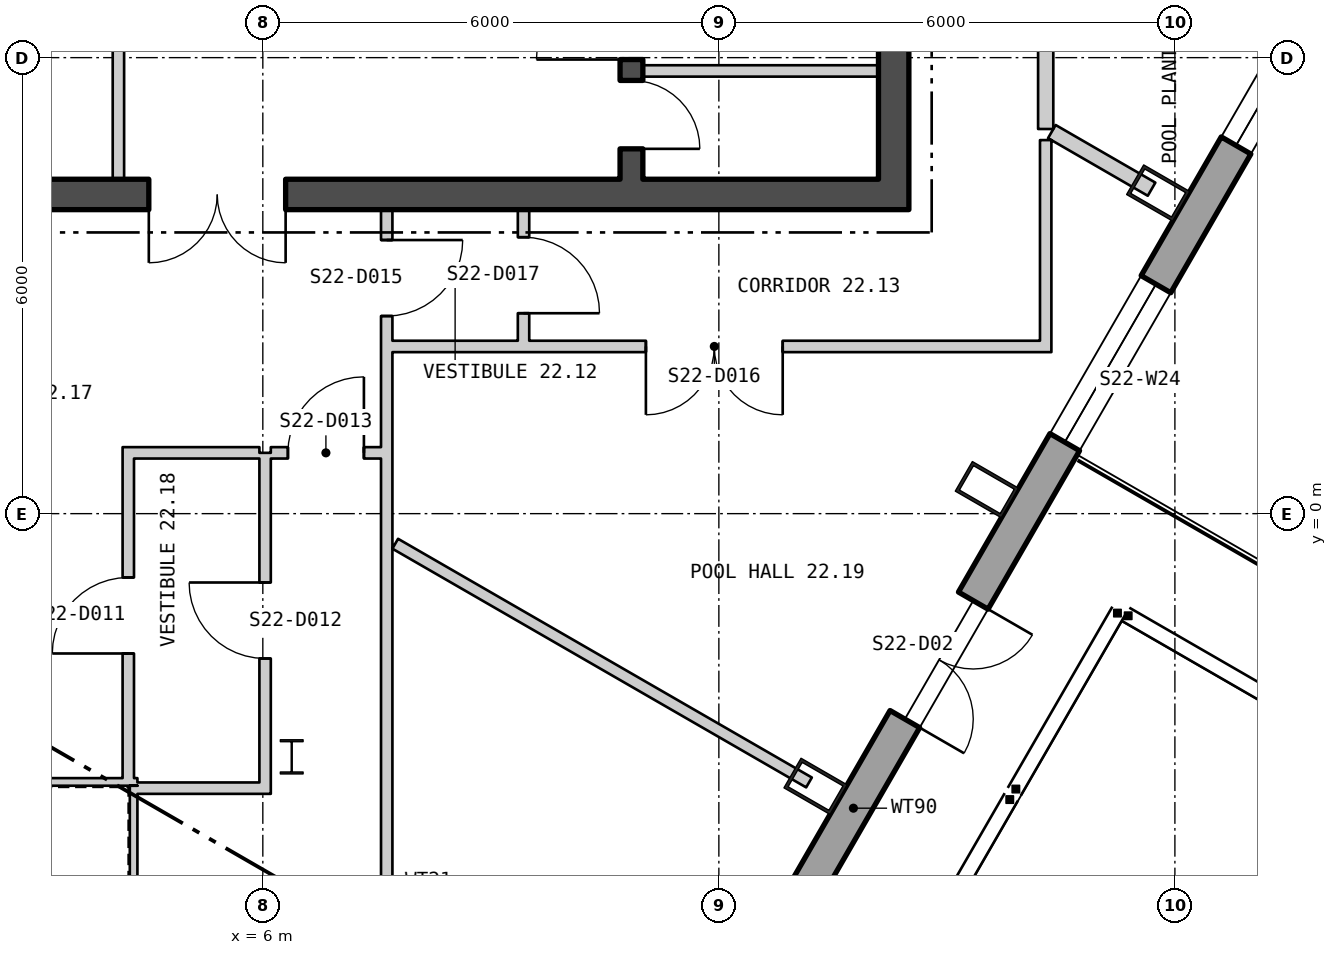
"""IFC4 building model, lengths in metres.
Left out: names, types, materials, properties, quantities, classifications, styles, units other than length and angle.
Written with IfcOpenShell. Run it as: python <this file> out.ifc"""

import sys

from ifc_helpers import new_model, si_unit, direction, frame, frame_2d, origin, origin_2d, place, context, subcontext, project, spatial, polyline, rectangle, hollow_rectangle, i_section, outline, extrude, element, fill, save


model = new_model("IFC4")
c1 = context("Model", 3, precision=1e-05, world=origin(), true_north=direction((0.0, 1.0)))
c2 = subcontext(c1, "Body", "Model", "MODEL_VIEW")
j1 = project(units=[si_unit("LENGTHUNIT", "METRE"), si_unit("PLANEANGLEUNIT", "RADIAN")], contexts=[c1])
p1 = place(None, origin())
s1 = spatial("IfcSite", under=j1, at=p1, CompositionType="ELEMENT")
p2 = place(p1, origin())
s2 = spatial("IfcBuilding", under=s1, at=p2, CompositionType="ELEMENT")
p3 = place(p2, frame((0.0, 0.0, 298.2)))
s3 = spatial("IfcBuildingStorey", under=s2, at=p3, CompositionType="ELEMENT", Elevation=298.2)
for number, where, z_axis, x_axis in (
    (1, (13.272, -3.588, 0.0), (0.0, 0.0, 1.0), (0.5, 0.866, 0.0)),
    (2, (15.526, 0.316, 0.0), (0.0, 0.0, 1.0), (0.5, 0.866, 0.0)),
    (3, (17.78, 4.219, 0.0), (0.0, 0.0, 1.0), (0.5, 0.866, 0.0)),
):
    element("IfcColumn", number, at=place(p3, frame(where, z_axis=z_axis, x_axis=x_axis)), inside=s3, PredefinedType="COLUMN", context=c2, shape_type="SweptSolid", body=[
        extrude(hollow_rectangle(XDim=0.45, YDim=0.7, WallThickness=0.04, at=origin_2d()), origin(), (0.0, 0.0, 1.0), 6.0),
    ])
p4 = place(p3, frame((6.38, -3.2, 0.0), z_axis=(0.0, 0.0, 1.0), x_axis=(1.0, 0.0, 0.0)))
e4 = element("IfcColumn", 4, at=p4, inside=s3, PredefinedType="COLUMN", context=c2, shape_type="SweptSolid", body=[
    extrude(i_section(OverallWidth=0.3, OverallDepth=0.45, WebThickness=0.014, FlangeThickness=0.026, at=origin_2d()), origin(), (0.0, 0.0, 1.0), 6.0),
])
p5 = place(p3, frame((2.335, -23.682, -0.28), z_axis=(0.0, 0.0, 1.0), x_axis=(0.499999764979, 0.866025539474, 0.0)))
e5 = element("IfcWall", 5, at=p5, inside=s3, PredefinedType="SOLIDWALL", context=c2, shape_type="SweptSolid", body=[
    extrude(outline(polyline([(-0.13, -0.225), (45.87, -0.225), (45.61, 0.225), (0.13, 0.225), (-0.13, -0.225)])), origin(), (0.0, 0.0, 1.0), 6.1),
])
p6 = place(p5, frame((1.424, 0.0, 1.18)))
e6 = element("IfcOpeningElement", 6, at=p6, cuts=e5, PredefinedType="OPENING", context=c2, shape_type="SweptSolid", body=[
    extrude(rectangle(XDim=2.4, YDim=4.1, at=frame_2d((1.2, 2.05))), frame((0.0, 0.235, 0.0), z_axis=(0.0, -1.0, 0.0), x_axis=(1.0, 0.0, 0.0)), (0.0, 0.0, 1.0), 0.47),
])
p7 = place(p5, frame((5.893, 0.0, 1.18)))
e7 = element("IfcOpeningElement", 7, at=p7, cuts=e5, PredefinedType="OPENING", context=c2, shape_type="SweptSolid", body=[
    extrude(rectangle(XDim=2.4, YDim=4.1, at=frame_2d((1.2, 2.05))), frame((0.0, 0.235, 0.0), z_axis=(0.0, -1.0, 0.0), x_axis=(1.0, 0.0, 0.0)), (0.0, 0.0, 1.0), 0.47),
])
p8 = place(p5, frame((10.401, 0.0, 1.18)))
e8 = element("IfcOpeningElement", 8, at=p8, cuts=e5, PredefinedType="OPENING", context=c2, shape_type="SweptSolid", body=[
    extrude(rectangle(XDim=2.4, YDim=4.1, at=frame_2d((1.2, 2.05))), frame((0.0, 0.235, 0.0), z_axis=(0.0, -1.0, 0.0), x_axis=(1.0, 0.0, 0.0)), (0.0, 0.0, 1.0), 0.47),
])
p9 = place(p5, frame((14.909, 0.0, 1.18)))
e9 = element("IfcOpeningElement", 9, at=p9, cuts=e5, PredefinedType="OPENING", context=c2, shape_type="SweptSolid", body=[
    extrude(rectangle(XDim=2.4, YDim=4.1, at=frame_2d((1.2, 2.05))), frame((0.0, 0.235, 0.0), z_axis=(0.0, -1.0, 0.0), x_axis=(1.0, 0.0, 0.0)), (0.0, 0.0, 1.0), 0.47),
])
p10 = place(p5, frame((19.716, 0.0, 0.28)))
e10 = element("IfcOpeningElement", 10, at=p10, cuts=e5, PredefinedType="OPENING", context=c2, shape_type="SweptSolid", body=[
    extrude(rectangle(XDim=1.8, YDim=2.4, at=frame_2d((0.9, 1.2))), frame((0.0, 0.235, 0.0), z_axis=(0.0, -1.0, 0.0), x_axis=(1.0, 0.0, 0.0)), (0.0, 0.0, 1.0), 0.47),
])
p11 = place(p5, frame((24.224, 0.0, 0.28)))
e11 = element("IfcOpeningElement", 11, at=p11, cuts=e5, PredefinedType="OPENING", context=c2, shape_type="SweptSolid", body=[
    extrude(rectangle(XDim=1.8, YDim=2.4, at=frame_2d((0.9, 1.2))), frame((0.0, 0.235, 0.0), z_axis=(0.0, -1.0, 0.0), x_axis=(1.0, 0.0, 0.0)), (0.0, 0.0, 1.0), 0.47),
])
p12 = place(p5, frame((28.431, 0.0, 1.18)))
e12 = element("IfcOpeningElement", 12, at=p12, cuts=e5, PredefinedType="OPENING", context=c2, shape_type="SweptSolid", body=[
    extrude(rectangle(XDim=2.4, YDim=4.1, at=frame_2d((1.2, 2.05))), frame((0.0, 0.235, 0.0), z_axis=(0.0, -1.0, 0.0), x_axis=(1.0, 0.0, 0.0)), (0.0, 0.0, 1.0), 0.47),
])
p13 = place(p5, frame((32.939, 0.0, 1.18)))
e13 = element("IfcOpeningElement", 13, at=p13, cuts=e5, PredefinedType="OPENING", context=c2, shape_type="SweptSolid", body=[
    extrude(rectangle(XDim=2.4, YDim=4.1, at=frame_2d((1.2, 2.05))), frame((0.0, 0.235, 0.0), z_axis=(0.0, -1.0, 0.0), x_axis=(1.0, 0.0, 0.0)), (0.0, 0.0, 1.0), 0.47),
])
p14 = place(p5, frame((37.447, 0.0, 1.18)))
e14 = element("IfcOpeningElement", 14, at=p14, cuts=e5, PredefinedType="OPENING", context=c2, shape_type="SweptSolid", body=[
    extrude(rectangle(XDim=2.4, YDim=4.1, at=frame_2d((1.2, 2.05))), frame((0.0, 0.235, 0.0), z_axis=(0.0, -1.0, 0.0), x_axis=(1.0, 0.0, 0.0)), (0.0, 0.0, 1.0), 0.47),
])
p15 = place(p5, frame((41.916, 0.0, 1.18)))
e15 = element("IfcOpeningElement", 15, at=p15, cuts=e5, PredefinedType="OPENING", context=c2, shape_type="SweptSolid", body=[
    extrude(rectangle(XDim=2.4, YDim=4.1, at=frame_2d((1.2, 2.05))), frame((0.0, 0.235, 0.0), z_axis=(0.0, -1.0, 0.0), x_axis=(1.0, 0.0, 0.0)), (0.0, 0.0, 1.0), 0.47),
])
p16 = place(p3, frame((4.3, -11.62, 0.0), z_axis=(0.0, 0.0, 1.0), x_axis=(0.0, 1.0, 0.0)))
e16 = element("IfcWall", 16, at=p16, inside=s3, PredefinedType="PARTITIONING", context=c2, shape_type="SweptSolid", body=[
    extrude(rectangle(XDim=8.04, YDim=0.1, at=frame_2d((4.02, 0.0))), origin(), (0.0, 0.0, 1.0), 5.8),
])
p17 = place(p3, frame((4.35, -3.53, 0.0), z_axis=(0.0, 0.0, 1.0), x_axis=(-1.0, 0.0, 0.0)))
e17 = element("IfcWall", 17, at=p17, inside=s3, PredefinedType="PARTITIONING", context=c2, shape_type="SweptSolid", body=[
    extrude(rectangle(XDim=8.7, YDim=0.1, at=frame_2d((4.35, 0.0))), origin(), (0.0, 0.0, 1.0), 5.8),
])
p18 = place(p3, frame((-14.5, 4.2, 0.0), z_axis=(0.0, 0.0, 1.0), x_axis=(1.0, 0.0, 0.0)))
e18 = element("IfcWall", 18, at=p18, inside=s3, PredefinedType="SHEAR", context=c2, shape_type="SweptSolid", body=[
    extrude(rectangle(XDim=29.0, YDim=0.4, at=frame_2d((14.5, 0.0))), origin(), (0.0, 0.0, 1.0), 5.8),
])
p19 = place(p18, frame((9.0, 0.0, 0.0)))
e19 = element("IfcOpeningElement", 19, at=p19, cuts=e18, PredefinedType="OPENING", context=c2, shape_type="SweptSolid", body=[
    extrude(rectangle(XDim=1.8, YDim=2.4, at=frame_2d((0.9, 1.2))), frame((0.0, 0.21, 0.0), z_axis=(0.0, -1.0, 0.0), x_axis=(1.0, 0.0, 0.0)), (0.0, 0.0, 1.0), 0.42),
])
p20 = place(p18, frame((19.0, 0.0, 0.0)))
e20 = element("IfcOpeningElement", 20, at=p20, cuts=e18, PredefinedType="OPENING", context=c2, shape_type="SweptSolid", body=[
    extrude(rectangle(XDim=1.8, YDim=2.4, at=frame_2d((0.9, 1.2))), frame((0.0, 0.21, 0.0), z_axis=(0.0, -1.0, 0.0), x_axis=(1.0, 0.0, 0.0)), (0.0, 0.0, 1.0), 0.42),
])
p21 = place(p3, frame((14.3, 4.4, 0.0), z_axis=(0.0, 0.0, 1.0), x_axis=(0.0, 1.0, 0.0)))
e21 = element("IfcWall", 21, at=p21, inside=s3, PredefinedType="SHEAR", context=c2, shape_type="SweptSolid", body=[
    extrude(rectangle(XDim=13.2, YDim=0.4, at=frame_2d((6.6, 0.0))), origin(), (0.0, 0.0, 1.0), 5.8),
])
p22 = place(p21, frame((3.05, 0.0, 0.0)))
e22 = element("IfcOpeningElement", 22, at=p22, cuts=e21, PredefinedType="OPENING", context=c2, shape_type="SweptSolid", body=[
    extrude(rectangle(XDim=1.5, YDim=2.1, at=frame_2d((0.75, 1.05))), frame((0.0, 0.21, 0.0), z_axis=(0.0, -1.0, 0.0), x_axis=(1.0, 0.0, 0.0)), (0.0, 0.0, 1.0), 0.42),
])
p23 = place(p3, frame((10.85, 4.4, 0.0), z_axis=(0.0, 0.0, 1.0), x_axis=(0.0, 1.0, 0.0)))
e23 = element("IfcWall", 23, at=p23, inside=s3, PredefinedType="SHEAR", context=c2, shape_type="SweptSolid", body=[
    extrude(rectangle(XDim=13.2, YDim=0.3, at=frame_2d((6.6, 0.0))), origin(), (0.0, 0.0, 1.0), 5.8),
])
p24 = place(p23, frame((1.575, 0.0, 0.0)))
e24 = element("IfcOpeningElement", 24, at=p24, cuts=e23, PredefinedType="OPENING", context=c2, shape_type="SweptSolid", body=[
    extrude(rectangle(XDim=1.25, YDim=2.1, at=frame_2d((0.625, 1.05))), frame((0.0, 0.16, 0.0), z_axis=(0.0, -1.0, 0.0), x_axis=(1.0, 0.0, 0.0)), (0.0, 0.0, 1.0), 0.32),
])
p25 = place(p23, frame((0.4, 0.0, 0.0)))
e25 = element("IfcOpeningElement", 25, at=p25, cuts=e23, PredefinedType="OPENING", context=c2, shape_type="SweptSolid", body=[
    extrude(rectangle(XDim=0.9, YDim=2.1, at=frame_2d((0.45, 1.05))), frame((0.0, 0.16, 0.0), z_axis=(0.0, -1.0, 0.0), x_axis=(1.0, 0.0, 0.0)), (0.0, 0.0, 1.0), 0.32),
])
p26 = place(p3, frame((11.0, 5.825, 0.0), z_axis=(0.0, 0.0, 1.0), x_axis=(1.0, 0.0, 0.0)))
e26 = element("IfcWall", 26, at=p26, inside=s3, PredefinedType="PARTITIONING", context=c2, shape_type="SweptSolid", body=[
    extrude(rectangle(XDim=3.1, YDim=0.15, at=frame_2d((1.55, 0.0))), origin(), (0.0, 0.0, 1.0), 5.8),
])
p27 = place(p3, frame((4.1, 4.4, 0.0), z_axis=(0.0, 0.0, 1.0), x_axis=(0.0, 1.0, 0.0)))
e27 = element("IfcWall", 27, at=p27, inside=s3, PredefinedType="PARTITIONING", context=c2, shape_type="SweptSolid", body=[
    extrude(rectangle(XDim=1.895, YDim=0.15, at=frame_2d((0.948, 0.0))), origin(), (0.0, 0.0, 1.0), 5.8),
])
p28 = place(p3, frame((4.23, -3.48, 0.0), z_axis=(0.0, 0.0, 1.0), x_axis=(0.0, 1.0, 0.0)))
e28 = element("IfcWall", 28, at=p28, inside=s3, PredefinedType="PARTITIONING", context=c2, shape_type="SweptSolid", body=[
    extrude(rectangle(XDim=4.355, YDim=0.15, at=frame_2d((2.178, 0.0))), origin(), (0.0, 0.0, 1.0), 5.8),
])
p29 = place(p28, frame((1.64, 0.0, 0.0)))
e29 = element("IfcOpeningElement", 29, at=p29, cuts=e28, PredefinedType="OPENING", context=c2, shape_type="SweptSolid", body=[
    extrude(rectangle(XDim=1.0, YDim=2.1, at=frame_2d((0.5, 1.05))), frame((0.0, 0.085, 0.0), z_axis=(0.0, -1.0, 0.0), x_axis=(1.0, 0.0, 0.0)), (0.0, 0.0, 1.0), 0.17),
])
p30 = place(p3, frame((4.305, 0.8, 0.0), z_axis=(0.0, 0.0, 1.0), x_axis=(1.0, 0.0, 0.0)))
e30 = element("IfcWall", 30, at=p30, inside=s3, PredefinedType="PARTITIONING", context=c2, shape_type="SweptSolid", body=[
    extrude(rectangle(XDim=1.65, YDim=0.15, at=frame_2d((0.825, 0.0))), origin(), (0.0, 0.0, 1.0), 5.8),
])
p31 = place(p3, frame((4.35, -3.612, 0.0), z_axis=(0.0, 0.0, 1.0), x_axis=(1.0, 0.0, 0.0)))
e31 = element("IfcWall", 31, at=p31, inside=s3, PredefinedType="PARTITIONING", context=c2, shape_type="SweptSolid", body=[
    extrude(rectangle(XDim=1.605, YDim=0.15, at=frame_2d((0.802, 0.0))), origin(), (0.0, 0.0, 1.0), 5.8),
])
p32 = place(p3, frame((6.03, -3.687, 0.0), z_axis=(0.0, 0.0, 1.0), x_axis=(0.0, 1.0, 0.0)))
e32 = element("IfcWall", 32, at=p32, inside=s3, PredefinedType="PARTITIONING", context=c2, shape_type="SweptSolid", body=[
    extrude(rectangle(XDim=4.487, YDim=0.15, at=frame_2d((2.244, 0.0))), origin(), (0.0, 0.0, 1.0), 5.8),
])
p33 = place(p32, frame((1.781, 0.0, 0.0)))
e33 = element("IfcOpeningElement", 33, at=p33, cuts=e32, PredefinedType="OPENING", context=c2, shape_type="SweptSolid", body=[
    extrude(rectangle(XDim=1.0, YDim=2.1, at=frame_2d((0.5, 1.05))), frame((0.0, 0.085, 0.0), z_axis=(0.0, -1.0, 0.0), x_axis=(1.0, 0.0, 0.0)), (0.0, 0.0, 1.0), 0.17),
])
p34 = place(p3, frame((6.105, 0.8, 0.0), z_axis=(0.0, 0.0, 1.0), x_axis=(1.0, 0.0, 0.0)))
e34 = element("IfcWall", 34, at=p34, inside=s3, PredefinedType="PARTITIONING", context=c2, shape_type="SweptSolid", body=[
    extrude(rectangle(XDim=1.45, YDim=0.15, at=frame_2d((0.725, 0.0))), origin(), (0.0, 0.0, 1.0), 5.8),
])
p35 = place(p34, frame((0.225, 0.0, 0.0)))
e35 = element("IfcOpeningElement", 35, at=p35, cuts=e34, PredefinedType="OPENING", context=c2, shape_type="SweptSolid", body=[
    extrude(rectangle(XDim=1.0, YDim=2.1, at=frame_2d((0.5, 1.05))), frame((0.0, 0.085, 0.0), z_axis=(0.0, -1.0, 0.0), x_axis=(1.0, 0.0, 0.0)), (0.0, 0.0, 1.0), 0.17),
])
p36 = place(p3, frame((7.63, -13.675, 0.0), z_axis=(0.0, 0.0, 1.0), x_axis=(0.0, 1.0, 0.0)))
e36 = element("IfcWall", 36, at=p36, inside=s3, PredefinedType="PARTITIONING", context=c2, shape_type="SweptSolid", body=[
    extrude(rectangle(XDim=17.675, YDim=0.15, at=frame_2d((8.838, 0.0))), origin(), (0.0, 0.0, 1.0), 5.8),
])
p37 = place(p36, frame((2.829, 0.0, 0.0)))
e37 = element("IfcOpeningElement", 37, at=p37, cuts=e36, PredefinedType="OPENING", context=c2, shape_type="SweptSolid", body=[
    extrude(rectangle(XDim=1.8, YDim=2.1, at=frame_2d((0.9, 1.05))), frame((0.0, 0.085, 0.0), z_axis=(0.0, -1.0, 0.0), x_axis=(1.0, 0.0, 0.0)), (0.0, 0.0, 1.0), 0.17),
])
p38 = place(p36, frame((16.275, 0.0, 0.0)))
e38 = element("IfcOpeningElement", 38, at=p38, cuts=e36, PredefinedType="OPENING", context=c2, shape_type="SweptSolid", body=[
    extrude(rectangle(XDim=1.0, YDim=2.1, at=frame_2d((0.5, 1.05))), frame((0.0, 0.085, 0.0), z_axis=(0.0, -1.0, 0.0), x_axis=(1.0, 0.0, 0.0)), (0.0, 0.0, 1.0), 0.17),
])
p39 = place(p3, frame((7.705, 2.2, 0.0), z_axis=(0.0, 0.0, 1.0), x_axis=(1.0, 0.0, 0.0)))
e39 = element("IfcWall", 39, at=p39, inside=s3, PredefinedType="PARTITIONING", context=c2, shape_type="SweptSolid", body=[
    extrude(rectangle(XDim=8.67, YDim=0.15, at=frame_2d((4.335, 0.0))), origin(), (0.0, 0.0, 1.0), 5.8),
])
p40 = place(p39, frame((3.335, 0.0, 0.0)))
e40 = element("IfcOpeningElement", 40, at=p40, cuts=e39, PredefinedType="OPENING", context=c2, shape_type="SweptSolid", body=[
    extrude(rectangle(XDim=1.8, YDim=2.1, at=frame_2d((0.9, 1.05))), frame((0.0, 0.085, 0.0), z_axis=(0.0, -1.0, 0.0), x_axis=(1.0, 0.0, 0.0)), (0.0, 0.0, 1.0), 0.17),
])
p41 = place(p3, frame((7.742, -0.396, 0.0), z_axis=(0.0, 0.0, 1.0), x_axis=(0.866169692731, -0.499750000894, 0.0)))
e41 = element("IfcWall", 41, at=p41, inside=s3, PredefinedType="PARTITIONING", context=c2, shape_type="SweptSolid", body=[
    extrude(rectangle(XDim=6.285, YDim=0.15, at=frame_2d((3.143, 0.0))), origin(), (0.0, 0.0, 1.0), 5.8),
])
p42 = place(p3, frame((9.43, 2.275, 0.0), z_axis=(0.0, 0.0, 1.0), x_axis=(0.0, 1.0, 0.0)))
e42 = element("IfcWall", 42, at=p42, inside=s3, PredefinedType="PARTITIONING", context=c2, shape_type="SweptSolid", body=[
    extrude(rectangle(XDim=1.725, YDim=0.15, at=frame_2d((0.863, 0.0))), origin(), (0.0, 0.0, 1.0), 5.8),
])
p43 = place(p42, frame((0.362, 0.0, 0.0)))
e43 = element("IfcOpeningElement", 43, at=p43, cuts=e42, PredefinedType="OPENING", context=c2, shape_type="SweptSolid", body=[
    extrude(rectangle(XDim=1.0, YDim=2.1, at=frame_2d((0.5, 1.05))), frame((0.0, 0.085, 0.0), z_axis=(0.0, -1.0, 0.0), x_axis=(1.0, 0.0, 0.0)), (0.0, 0.0, 1.0), 0.17),
])
p44 = place(p3, frame((16.3, 2.275, 0.0), z_axis=(0.0, 0.0, 1.0), x_axis=(0.0, 1.0, 0.0)))
e44 = element("IfcWall", 44, at=p44, inside=s3, PredefinedType="PARTITIONING", context=c2, shape_type="SweptSolid", body=[
    extrude(rectangle(XDim=2.64, YDim=0.15, at=frame_2d((1.32, 0.0))), origin(), (0.0, 0.0, 1.0), 5.8),
])
p45 = place(p3, frame((16.3, 5.061, 0.0), z_axis=(0.0, 0.0, 1.0), x_axis=(0.0, 1.0, 0.0)))
e45 = element("IfcWall", 45, at=p45, inside=s3, PredefinedType="PARTITIONING", context=c2, shape_type="SweptSolid", body=[
    extrude(rectangle(XDim=8.437, YDim=0.2, at=frame_2d((4.218, 0.0))), origin(), (0.0, 0.0, 1.0), 5.8),
])
p46 = place(p45, frame((2.115, 0.0, 0.0)))
e46 = element("IfcOpeningElement", 46, at=p46, cuts=e45, PredefinedType="OPENING", context=c2, shape_type="SweptSolid", body=[
    extrude(rectangle(XDim=0.9, YDim=2.1, at=frame_2d((0.45, 1.05))), frame((0.0, 0.11, 0.0), z_axis=(0.0, -1.0, 0.0), x_axis=(1.0, 0.0, 0.0)), (0.0, 0.0, 1.0), 0.22),
])
p47 = place(p45, frame((6.371, 0.0, 0.0)))
e47 = element("IfcOpeningElement", 47, at=p47, cuts=e45, PredefinedType="OPENING", context=c2, shape_type="SweptSolid", body=[
    extrude(rectangle(XDim=0.9, YDim=2.1, at=frame_2d((0.45, 1.05))), frame((0.0, 0.11, 0.0), z_axis=(0.0, -1.0, 0.0), x_axis=(1.0, 0.0, 0.0)), (0.0, 0.0, 1.0), 0.22),
])
p48 = place(p3, frame((16.381, 5.027, 0.0), z_axis=(0.0, 0.0, 1.0), x_axis=(0.865877778751, -0.500255606931, 0.0)))
e48 = element("IfcWall", 48, at=p48, inside=s3, PredefinedType="PARTITIONING", context=c2, shape_type="SweptSolid", body=[
    extrude(rectangle(XDim=1.515, YDim=0.2, at=frame_2d((0.758, 0.0))), origin(), (0.0, 0.0, 1.0), 5.8),
])
p49 = place(p11, frame((1.8, 0.0, 0.0), z_axis=(0.0, 0.0, 1.0), x_axis=(-1.0, 0.0, 0.0)))
e49 = element("IfcDoor", 49, at=p49, inside=s3, OperationType="DOUBLE_DOOR_SINGLE_SWING", PredefinedType="DOOR", context=c2, shape_type="SweptSolid", body=[
    extrude(rectangle(XDim=1.8, YDim=2.4, at=frame_2d((0.9, 1.2))), frame((0.0, 0.025, 0.0), z_axis=(0.0, -1.0, 0.0), x_axis=(1.0, 0.0, 0.0)), (0.0, 0.0, 1.0), 0.05),
])
fill(e11, e49)
p50 = place(p12, origin())
e50 = element("IfcWindow", 50, at=p50, inside=s3, PartitioningType="SINGLE_PANEL", PredefinedType="WINDOW", context=c2, shape_type="SweptSolid", body=[
    extrude(rectangle(XDim=2.4, YDim=4.1, at=frame_2d((1.2, 2.05))), frame((0.0, 0.105, 0.0), z_axis=(0.0, -1.0, 0.0), x_axis=(1.0, 0.0, 0.0)), (0.0, 0.0, 1.0), 0.06),
])
fill(e12, e50)
p51 = place(p13, origin())
e51 = element("IfcWindow", 51, at=p51, inside=s3, PartitioningType="SINGLE_PANEL", PredefinedType="WINDOW", context=c2, shape_type="SweptSolid", body=[
    extrude(rectangle(XDim=2.4, YDim=4.1, at=frame_2d((1.2, 2.05))), frame((0.0, 0.105, 0.0), z_axis=(0.0, -1.0, 0.0), x_axis=(1.0, 0.0, 0.0)), (0.0, 0.0, 1.0), 0.06),
])
fill(e13, e51)
p52 = place(p24, origin())
e52 = element("IfcDoor", 52, at=p52, inside=s3, OperationType="SINGLE_SWING_RIGHT", PredefinedType="DOOR", context=c2, shape_type="SweptSolid", body=[
    extrude(rectangle(XDim=1.25, YDim=2.1, at=frame_2d((0.625, 1.05))), frame((0.0, 0.025, 0.0), z_axis=(0.0, -1.0, 0.0), x_axis=(1.0, 0.0, 0.0)), (0.0, 0.0, 1.0), 0.05),
])
fill(e24, e52)
p53 = place(p25, origin())
e53 = element("IfcDoor", 53, at=p53, inside=s3, OperationType="SINGLE_SWING_LEFT", PredefinedType="DOOR", context=c2, shape_type="SweptSolid", body=[
    extrude(rectangle(XDim=0.9, YDim=2.1, at=frame_2d((0.45, 1.05))), frame((0.0, 0.025, 0.0), z_axis=(0.0, -1.0, 0.0), x_axis=(1.0, 0.0, 0.0)), (0.0, 0.0, 1.0), 0.05),
])
fill(e25, e53)
p54 = place(p20, origin())
e54 = element("IfcDoor", 54, at=p54, inside=s3, OperationType="DOUBLE_DOOR_SINGLE_SWING", PredefinedType="DOOR", context=c2, shape_type="SweptSolid", body=[
    extrude(rectangle(XDim=1.8, YDim=2.4, at=frame_2d((0.9, 1.2))), frame((0.0, 0.025, 0.0), z_axis=(0.0, -1.0, 0.0), x_axis=(1.0, 0.0, 0.0)), (0.0, 0.0, 1.0), 0.05),
])
fill(e20, e54)
p55 = place(p29, origin())
e55 = element("IfcDoor", 55, at=p55, inside=s3, OperationType="SINGLE_SWING_RIGHT", PredefinedType="DOOR", context=c2, shape_type="SweptSolid", body=[
    extrude(rectangle(XDim=1.0, YDim=2.1, at=frame_2d((0.5, 1.05))), frame((0.0, 0.025, 0.0), z_axis=(0.0, -1.0, 0.0), x_axis=(1.0, 0.0, 0.0)), (0.0, 0.0, 1.0), 0.05),
])
fill(e29, e55)
p56 = place(p33, origin())
e56 = element("IfcDoor", 56, at=p56, inside=s3, OperationType="SINGLE_SWING_LEFT", PredefinedType="DOOR", context=c2, shape_type="SweptSolid", body=[
    extrude(rectangle(XDim=1.0, YDim=2.1, at=frame_2d((0.5, 1.05))), frame((0.0, 0.025, 0.0), z_axis=(0.0, -1.0, 0.0), x_axis=(1.0, 0.0, 0.0)), (0.0, 0.0, 1.0), 0.05),
])
fill(e33, e56)
p57 = place(p35, origin())
e57 = element("IfcDoor", 57, at=p57, inside=s3, OperationType="SINGLE_SWING_LEFT", PredefinedType="DOOR", context=c2, shape_type="SweptSolid", body=[
    extrude(rectangle(XDim=1.0, YDim=2.1, at=frame_2d((0.5, 1.05))), frame((0.0, 0.025, 0.0), z_axis=(0.0, -1.0, 0.0), x_axis=(1.0, 0.0, 0.0)), (0.0, 0.0, 1.0), 0.05),
])
fill(e35, e57)
p58 = place(p38, origin())
e58 = element("IfcDoor", 58, at=p58, inside=s3, OperationType="SINGLE_SWING_RIGHT", PredefinedType="DOOR", context=c2, shape_type="SweptSolid", body=[
    extrude(rectangle(XDim=1.0, YDim=2.1, at=frame_2d((0.5, 1.05))), frame((0.0, 0.025, 0.0), z_axis=(0.0, -1.0, 0.0), x_axis=(1.0, 0.0, 0.0)), (0.0, 0.0, 1.0), 0.05),
])
fill(e38, e58)
p59 = place(p40, origin())
e59 = element("IfcDoor", 59, at=p59, inside=s3, OperationType="DOUBLE_DOOR_SINGLE_SWING", PredefinedType="DOOR", context=c2, shape_type="SweptSolid", body=[
    extrude(rectangle(XDim=1.8, YDim=2.1, at=frame_2d((0.9, 1.05))), frame((0.0, 0.025, 0.0), z_axis=(0.0, -1.0, 0.0), x_axis=(1.0, 0.0, 0.0)), (0.0, 0.0, 1.0), 0.05),
])
fill(e40, e59)
p60 = place(p43, origin())
e60 = element("IfcDoor", 60, at=p60, inside=s3, OperationType="SINGLE_SWING_LEFT", PredefinedType="DOOR", context=c2, shape_type="SweptSolid", body=[
    extrude(rectangle(XDim=1.0, YDim=2.1, at=frame_2d((0.5, 1.05))), frame((0.0, 0.025, 0.0), z_axis=(0.0, -1.0, 0.0), x_axis=(1.0, 0.0, 0.0)), (0.0, 0.0, 1.0), 0.05),
])
fill(e43, e60)
save(model, sys.argv[1])
